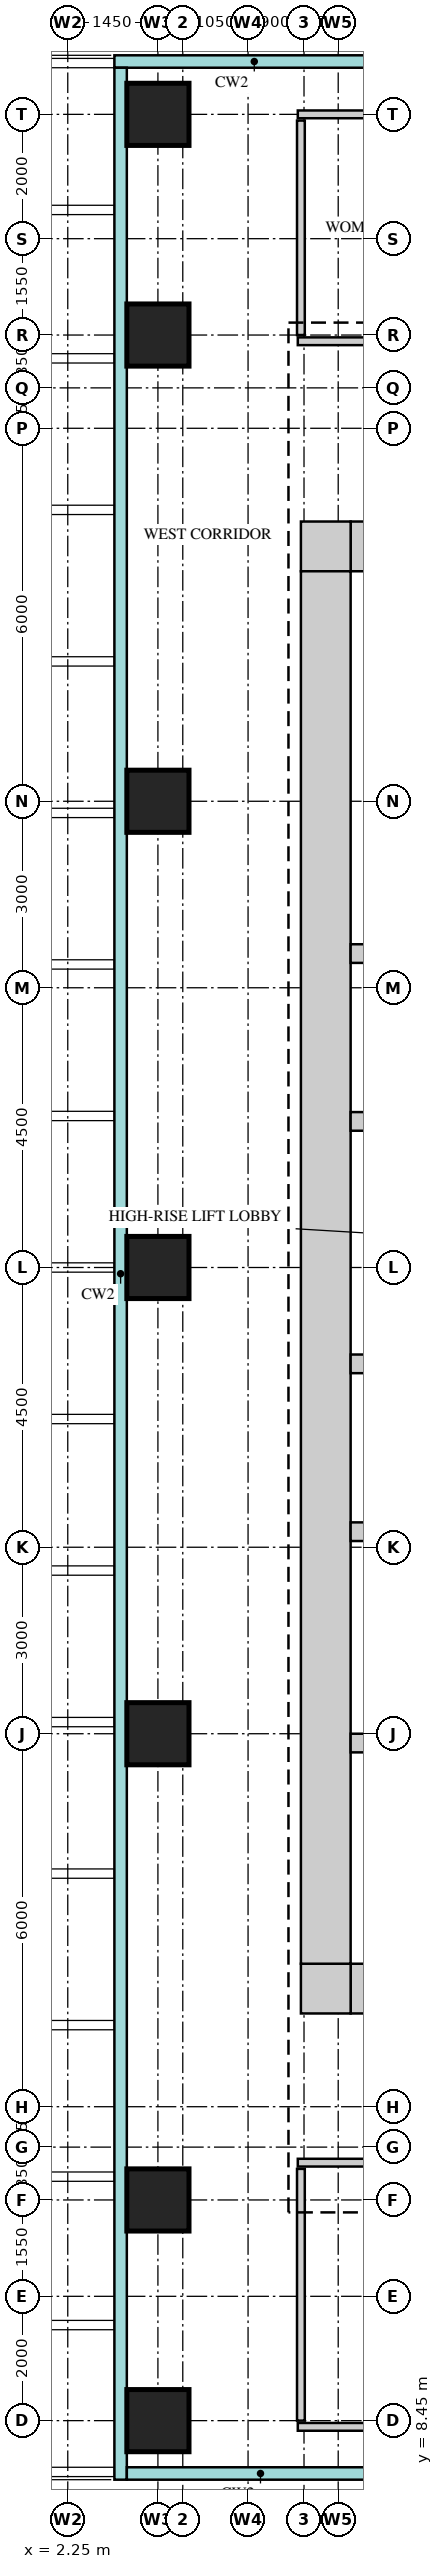
"""IFC4 building model, lengths in metres.
Left out: names, types, materials, properties, quantities, classifications, styles, units other than length and angle.
Written with IfcOpenShell. Run it as: python <this file> out.ifc"""

import sys

from ifc_helpers import new_model, si_unit, direction, frame, frame_2d, origin, origin_2d, place, context, subcontext, project, spatial, rectangle, extrude, source, transform, mapped, element, save


model = new_model("IFC4")
c1 = context("Model", 3, precision=1e-05, world=origin(), true_north=direction((0.0, 1.0)))
c2 = subcontext(c1, "Body", "Model", "MODEL_VIEW")
j1 = project(units=[si_unit("LENGTHUNIT", "METRE"), si_unit("PLANEANGLEUNIT", "RADIAN")], contexts=[c1])
p1 = place(None, origin())
s1 = spatial("IfcSite", under=j1, at=p1, CompositionType="ELEMENT")
p2 = place(p1, origin())
s2 = spatial("IfcBuilding", under=s1, at=p2, CompositionType="ELEMENT")
p3 = place(p2, frame((0.0, 0.0, 188.7)))
s3 = spatial("IfcBuildingStorey", under=s2, at=p3, CompositionType="ELEMENT", Elevation=188.7)
m1 = source(origin(), c2, "Body", "SweptSolid", [
    extrude(rectangle(XDim=13.4, YDim=0.8, at=frame_2d((6.7, 0.0))), origin(), (0.0, 0.0, 1.0), 3.75),
])
p4 = place(p3, frame((6.8, 38.6, 0.0), z_axis=(0.0, 0.0, 1.0), x_axis=(1.0, 0.0, 0.0)))
e1 = element("IfcWall", 1, at=p4, inside=s3, PredefinedType="SHEAR", context=c2, shape_type="MappedRepresentation", body=[
    mapped(m1, transform((0.0, 0.0, 0.0))),
])
m2 = source(origin(), c2, "Body", "SweptSolid", [
    extrude(rectangle(XDim=0.9, YDim=2.1, at=frame_2d((0.45, 1.05))), frame((0.0, 0.41, 0.0), z_axis=(0.0, -1.0, 0.0), x_axis=(1.0, 0.0, 0.0)), (0.0, 0.0, 1.0), 0.82),
])
p5 = place(p4, frame((1.75, 0.0, 0.0)))
e2 = element("IfcOpeningElement", 2, at=p5, cuts=e1, PredefinedType="OPENING", context=c2, shape_type="MappedRepresentation", body=[
    mapped(m2, transform((0.0, 0.0, 0.0))),
])
p6 = place(p4, frame((8.45, 0.0, 0.0)))
e3 = element("IfcOpeningElement", 3, at=p6, cuts=e1, PredefinedType="OPENING", context=c2, shape_type="MappedRepresentation", body=[
    mapped(m2, transform((0.0, 0.0, 0.0))),
])
m3 = source(origin(), c2, "Body", "SweptSolid", [
    extrude(rectangle(XDim=0.8, YDim=0.8, at=frame_2d((0.4, 0.0))), origin(), (0.0, 0.0, 1.0), 3.75),
])
p7 = place(p3, frame((6.0, 38.6, 0.0), z_axis=(0.0, 0.0, 1.0), x_axis=(1.0, 0.0, 0.0)))
e4 = element("IfcWall", 4, at=p7, inside=s3, PredefinedType="SHEAR", context=c2, shape_type="MappedRepresentation", body=[
    mapped(m3, transform((0.0, 0.0, 0.0))),
])
p8 = place(p3, frame((6.8, 15.4, 0.0), z_axis=(0.0, 0.0, 1.0), x_axis=(1.0, 0.0, 0.0)))
e5 = element("IfcWall", 5, at=p8, inside=s3, PredefinedType="SHEAR", context=c2, shape_type="MappedRepresentation", body=[
    mapped(m1, transform((0.0, 0.0, 0.0))),
])
m4 = source(origin(), c2, "Body", "SweptSolid", [
    extrude(rectangle(XDim=1.2, YDim=2.1, at=frame_2d((0.6, 1.05))), frame((0.0, 0.41, 0.0), z_axis=(0.0, -1.0, 0.0), x_axis=(1.0, 0.0, 0.0)), (0.0, 0.0, 1.0), 0.82),
])
p9 = place(p8, frame((5.4, 0.0, 0.0)))
e6 = element("IfcOpeningElement", 6, at=p9, cuts=e5, PredefinedType="OPENING", context=c2, shape_type="MappedRepresentation", body=[
    mapped(m4, transform((0.0, 0.0, 0.0))),
])
p10 = place(p8, frame((2.05, 0.0, 0.0)))
e7 = element("IfcOpeningElement", 7, at=p10, cuts=e5, PredefinedType="OPENING", context=c2, shape_type="MappedRepresentation", body=[
    mapped(m4, transform((0.0, 0.0, 0.0))),
])
m5 = source(origin(), c2, "Body", "SweptSolid", [
    extrude(rectangle(XDim=1.0, YDim=2.1, at=frame_2d((0.5, 1.05))), frame((0.0, 0.41, 0.0), z_axis=(0.0, -1.0, 0.0), x_axis=(1.0, 0.0, 0.0)), (0.0, 0.0, 1.0), 0.82),
])
p11 = place(p8, frame((7.9, 0.0, 0.0)))
e8 = element("IfcOpeningElement", 8, at=p11, cuts=e5, PredefinedType="OPENING", context=c2, shape_type="MappedRepresentation", body=[
    mapped(m5, transform((0.0, 0.0, 0.0))),
])
p12 = place(p3, frame((6.0, 15.4, 0.0), z_axis=(0.0, 0.0, 1.0), x_axis=(1.0, 0.0, 0.0)))
e9 = element("IfcWall", 9, at=p12, inside=s3, PredefinedType="SHEAR", context=c2, shape_type="MappedRepresentation", body=[
    mapped(m3, transform((0.0, 0.0, 0.0))),
])
m6 = source(origin(), c2, "Body", "SweptSolid", [
    extrude(rectangle(XDim=22.4, YDim=0.8, at=frame_2d((11.2, 0.0))), origin(), (0.0, 0.0, 1.0), 3.75),
])
p13 = place(p3, frame((6.4, 15.8, 0.0), z_axis=(0.0, 0.0, 1.0), x_axis=(0.0, 1.0, 0.0)))
e10 = element("IfcWall", 10, at=p13, inside=s3, PredefinedType="SHEAR", context=c2, shape_type="MappedRepresentation", body=[
    mapped(m6, transform((0.0, 0.0, 0.0))),
])
m7 = source(origin(), c2, "Body", "SweptSolid", [
    extrude(rectangle(XDim=13.4, YDim=0.3, at=frame_2d((6.7, 0.0))), origin(), (0.0, 0.0, 1.0), 3.75),
])
p14 = place(p3, frame((6.8, 22.75, 0.0), z_axis=(0.0, 0.0, 1.0), x_axis=(1.0, 0.0, 0.0)))
e11 = element("IfcWall", 11, at=p14, inside=s3, PredefinedType="STANDARD", context=c2, shape_type="MappedRepresentation", body=[
    mapped(m7, transform((0.0, 0.0, 0.0))),
])
m8 = source(origin(), c2, "Body", "SweptSolid", [
    extrude(rectangle(XDim=9.275, YDim=0.3, at=frame_2d((4.637, 0.0))), origin(), (0.0, 0.0, 1.0), 3.75),
])
p15 = place(p3, frame((6.8, 19.35, 0.0), z_axis=(0.0, 0.0, 1.0), x_axis=(1.0, 0.0, 0.0)))
e12 = element("IfcWall", 12, at=p15, inside=s3, PredefinedType="STANDARD", context=c2, shape_type="MappedRepresentation", body=[
    mapped(m8, transform((0.0, 0.0, 0.0))),
])
m9 = source(origin(), c2, "Body", "SweptSolid", [
    extrude(rectangle(XDim=1.2, YDim=2.1, at=frame_2d((0.6, 1.05))), frame((0.0, 0.16, 0.0), z_axis=(0.0, -1.0, 0.0), x_axis=(1.0, 0.0, 0.0)), (0.0, 0.0, 1.0), 0.32),
])
p16 = place(p15, frame((0.85, 0.0, 0.0)))
e13 = element("IfcOpeningElement", 13, at=p16, cuts=e12, PredefinedType="OPENING", context=c2, shape_type="MappedRepresentation", body=[
    mapped(m9, transform((0.0, 0.0, 0.0))),
])
p17 = place(p15, frame((3.2, 0.0, 0.0)))
e14 = element("IfcOpeningElement", 14, at=p17, cuts=e12, PredefinedType="OPENING", context=c2, shape_type="MappedRepresentation", body=[
    mapped(m9, transform((0.0, 0.0, 0.0))),
])
p18 = place(p15, frame((5.45, 0.0, 0.0)))
e15 = element("IfcOpeningElement", 15, at=p18, cuts=e12, PredefinedType="OPENING", context=c2, shape_type="MappedRepresentation", body=[
    mapped(m9, transform((0.0, 0.0, 0.0))),
])
p19 = place(p15, frame((7.6, 0.0, 0.0)))
e16 = element("IfcOpeningElement", 16, at=p19, cuts=e12, PredefinedType="OPENING", context=c2, shape_type="MappedRepresentation", body=[
    mapped(m9, transform((0.0, 0.0, 0.0))),
])
p20 = place(p3, frame((6.8, 32.05, 0.0), z_axis=(0.0, 0.0, 1.0), x_axis=(1.0, 0.0, 0.0)))
e17 = element("IfcWall", 17, at=p20, inside=s3, PredefinedType="STANDARD", context=c2, shape_type="MappedRepresentation", body=[
    mapped(m7, transform((0.0, 0.0, 0.0))),
])
p21 = place(p3, frame((6.8, 29.35, 0.0), z_axis=(0.0, 0.0, 1.0), x_axis=(1.0, 0.0, 0.0)))
e18 = element("IfcWall", 18, at=p21, inside=s3, PredefinedType="STANDARD", context=c2, shape_type="MappedRepresentation", body=[
    mapped(m7, transform((0.0, 0.0, 0.0))),
])
p22 = place(p21, frame((0.95, 0.0, 0.0)))
e19 = element("IfcOpeningElement", 19, at=p22, cuts=e18, PredefinedType="OPENING", context=c2, shape_type="MappedRepresentation", body=[
    mapped(m9, transform((0.0, 0.0, 0.0))),
])
p23 = place(p21, frame((3.5, 0.0, 0.0)))
e20 = element("IfcOpeningElement", 20, at=p23, cuts=e18, PredefinedType="OPENING", context=c2, shape_type="MappedRepresentation", body=[
    mapped(m9, transform((0.0, 0.0, 0.0))),
])
p24 = place(p21, frame((6.05, 0.0, 0.0)))
e21 = element("IfcOpeningElement", 21, at=p24, cuts=e18, PredefinedType="OPENING", context=c2, shape_type="MappedRepresentation", body=[
    mapped(m9, transform((0.0, 0.0, 0.0))),
])
p25 = place(p21, frame((8.6, 0.0, 0.0)))
e22 = element("IfcOpeningElement", 22, at=p25, cuts=e18, PredefinedType="OPENING", context=c2, shape_type="MappedRepresentation", body=[
    mapped(m9, transform((0.0, 0.0, 0.0))),
])
p26 = place(p21, frame((11.15, 0.0, 0.0)))
e23 = element("IfcOpeningElement", 23, at=p26, cuts=e18, PredefinedType="OPENING", context=c2, shape_type="MappedRepresentation", body=[
    mapped(m9, transform((0.0, 0.0, 0.0))),
])
p27 = place(p3, frame((6.8, 25.45, 0.0), z_axis=(0.0, 0.0, 1.0), x_axis=(1.0, 0.0, 0.0)))
e24 = element("IfcWall", 24, at=p27, inside=s3, PredefinedType="STANDARD", context=c2, shape_type="MappedRepresentation", body=[
    mapped(m7, transform((0.0, 0.0, 0.0))),
])
p28 = place(p27, frame((0.95, 0.0, 0.0)))
e25 = element("IfcOpeningElement", 25, at=p28, cuts=e24, PredefinedType="OPENING", context=c2, shape_type="MappedRepresentation", body=[
    mapped(m9, transform((0.0, 0.0, 0.0))),
])
p29 = place(p27, frame((3.5, 0.0, 0.0)))
e26 = element("IfcOpeningElement", 26, at=p29, cuts=e24, PredefinedType="OPENING", context=c2, shape_type="MappedRepresentation", body=[
    mapped(m9, transform((0.0, 0.0, 0.0))),
])
p30 = place(p27, frame((6.05, 0.0, 0.0)))
e27 = element("IfcOpeningElement", 27, at=p30, cuts=e24, PredefinedType="OPENING", context=c2, shape_type="MappedRepresentation", body=[
    mapped(m9, transform((0.0, 0.0, 0.0))),
])
p31 = place(p27, frame((8.6, 0.0, 0.0)))
e28 = element("IfcOpeningElement", 28, at=p31, cuts=e24, PredefinedType="OPENING", context=c2, shape_type="MappedRepresentation", body=[
    mapped(m9, transform((0.0, 0.0, 0.0))),
])
p32 = place(p27, frame((11.15, 0.0, 0.0)))
e29 = element("IfcOpeningElement", 29, at=p32, cuts=e24, PredefinedType="OPENING", context=c2, shape_type="MappedRepresentation", body=[
    mapped(m9, transform((0.0, 0.0, 0.0))),
])
m10 = source(origin(), c2, "Body", "SweptSolid", [
    extrude(rectangle(XDim=1.0, YDim=1.0, at=origin_2d()), origin(), (0.0, 0.0, 1.0), 3.75),
])
for number, where, z_axis, x_axis in (
    (30, (3.7, 8.45, 0.0), (0.0, 0.0, 1.0), (1.0, 0.0, 0.0)),
    (31, (3.7, 12.0, 0.0), (0.0, 0.0, 1.0), (1.0, 0.0, 0.0)),
    (32, (3.7, 19.5, 0.0), (0.0, 0.0, 1.0), (1.0, 0.0, 0.0)),
    (33, (3.7, 27.0, 0.0), (0.0, 0.0, 1.0), (1.0, 0.0, 0.0)),
    (34, (3.7, 34.5, 0.0), (0.0, 0.0, 1.0), (1.0, 0.0, 0.0)),
    (35, (3.7, 42.0, 0.0), (0.0, 0.0, 1.0), (1.0, 0.0, 0.0)),
    (36, (3.7, 45.55, 0.0), (0.0, 0.0, 1.0), (1.0, 0.0, 0.0)),
):
    element("IfcColumn", number, at=place(p3, frame(where, z_axis=z_axis, x_axis=x_axis)), inside=s3, PredefinedType="COLUMN", context=c2, shape_type="MappedRepresentation", body=[
        mapped(m10, transform((0.0, 0.0, 0.0))),
    ])
m11 = source(origin(), c2, "Body", "SweptSolid", [
    extrude(rectangle(XDim=7.95, YDim=0.125, at=frame_2d((3.975, 0.0))), origin(), (0.0, 0.0, 1.0), 3.25),
])
p33 = place(p3, frame((5.95, 8.35, 0.0), z_axis=(0.0, 0.0, 1.0), x_axis=(1.0, 0.0, 0.0)))
e37 = element("IfcWall", 37, at=p33, inside=s3, PredefinedType="PARTITIONING", context=c2, shape_type="MappedRepresentation", body=[
    mapped(m11, transform((0.0, 0.0, 0.0))),
])
m12 = source(origin(), c2, "Body", "SweptSolid", [
    extrude(rectangle(XDim=0.9, YDim=2.1, at=frame_2d((0.45, 1.05))), frame((0.0, 0.073, 0.0), z_axis=(0.0, -1.0, 0.0), x_axis=(1.0, 0.0, 0.0)), (0.0, 0.0, 1.0), 0.145),
])
p34 = place(p33, frame((3.8, 0.0, 0.0)))
e38 = element("IfcOpeningElement", 38, at=p34, cuts=e37, PredefinedType="OPENING", context=c2, shape_type="MappedRepresentation", body=[
    mapped(m12, transform((0.0, 0.0, 0.0))),
])
m13 = source(origin(), c2, "Body", "SweptSolid", [
    extrude(rectangle(XDim=4.05, YDim=0.125, at=frame_2d((2.025, 0.0))), origin(), (0.0, 0.0, 1.0), 3.8),
])
p35 = place(p3, frame((6.0, 8.45, 0.0), z_axis=(0.0, 0.0, 1.0), x_axis=(0.0, 1.0, 0.0)))
e39 = element("IfcWall", 39, at=p35, inside=s3, PredefinedType="PARTITIONING", context=c2, shape_type="MappedRepresentation", body=[
    mapped(m13, transform((0.0, 0.0, 0.0))),
])
m14 = source(origin(), c2, "Body", "SweptSolid", [
    extrude(rectangle(XDim=8.0, YDim=0.125, at=frame_2d((4.0, 0.0))), origin(), (0.0, 0.0, 1.0), 3.8),
])
p36 = place(p3, frame((5.95, 12.6, 0.0), z_axis=(0.0, 0.0, 1.0), x_axis=(1.0, 0.0, 0.0)))
e40 = element("IfcWall", 40, at=p36, inside=s3, PredefinedType="PARTITIONING", context=c2, shape_type="MappedRepresentation", body=[
    mapped(m14, transform((0.0, 0.0, 0.0))),
])
m15 = source(origin(), c2, "Body", "SweptSolid", [
    extrude(rectangle(XDim=7.95, YDim=0.125, at=frame_2d((3.975, 0.0))), origin(), (0.0, 0.0, 1.0), 3.8),
])
p37 = place(p3, frame((5.95, 41.9, 0.0), z_axis=(0.0, 0.0, 1.0), x_axis=(1.0, 0.0, 0.0)))
e41 = element("IfcWall", 41, at=p37, inside=s3, PredefinedType="PARTITIONING", context=c2, shape_type="MappedRepresentation", body=[
    mapped(m15, transform((0.0, 0.0, 0.0))),
])
p38 = place(p37, frame((1.55, 0.0, 0.0)))
e42 = element("IfcOpeningElement", 42, at=p38, cuts=e41, PredefinedType="OPENING", context=c2, shape_type="MappedRepresentation", body=[
    mapped(m12, transform((0.0, 0.0, 0.0))),
])
p39 = place(p37, frame((5.65, 0.0, 0.0)))
e43 = element("IfcOpeningElement", 43, at=p39, cuts=e41, PredefinedType="OPENING", context=c2, shape_type="MappedRepresentation", body=[
    mapped(m12, transform((0.0, 0.0, 0.0))),
])
m16 = source(origin(), c2, "Body", "SweptSolid", [
    extrude(rectangle(XDim=3.45, YDim=0.125, at=frame_2d((1.725, 0.0))), origin(), (0.0, 0.0, 1.0), 3.8),
])
p40 = place(p3, frame((6.0, 42.0, 0.0), z_axis=(0.0, 0.0, 1.0), x_axis=(0.0, 1.0, 0.0)))
e44 = element("IfcWall", 44, at=p40, inside=s3, PredefinedType="PARTITIONING", context=c2, shape_type="MappedRepresentation", body=[
    mapped(m16, transform((0.0, 0.0, 0.0))),
])
p41 = place(p3, frame((5.95, 45.55, 0.0), z_axis=(0.0, 0.0, 1.0), x_axis=(1.0, 0.0, 0.0)))
e45 = element("IfcWall", 45, at=p41, inside=s3, PredefinedType="PARTITIONING", context=c2, shape_type="MappedRepresentation", body=[
    mapped(m11, transform((0.0, 0.0, 0.0))),
])
save(model, sys.argv[1])
